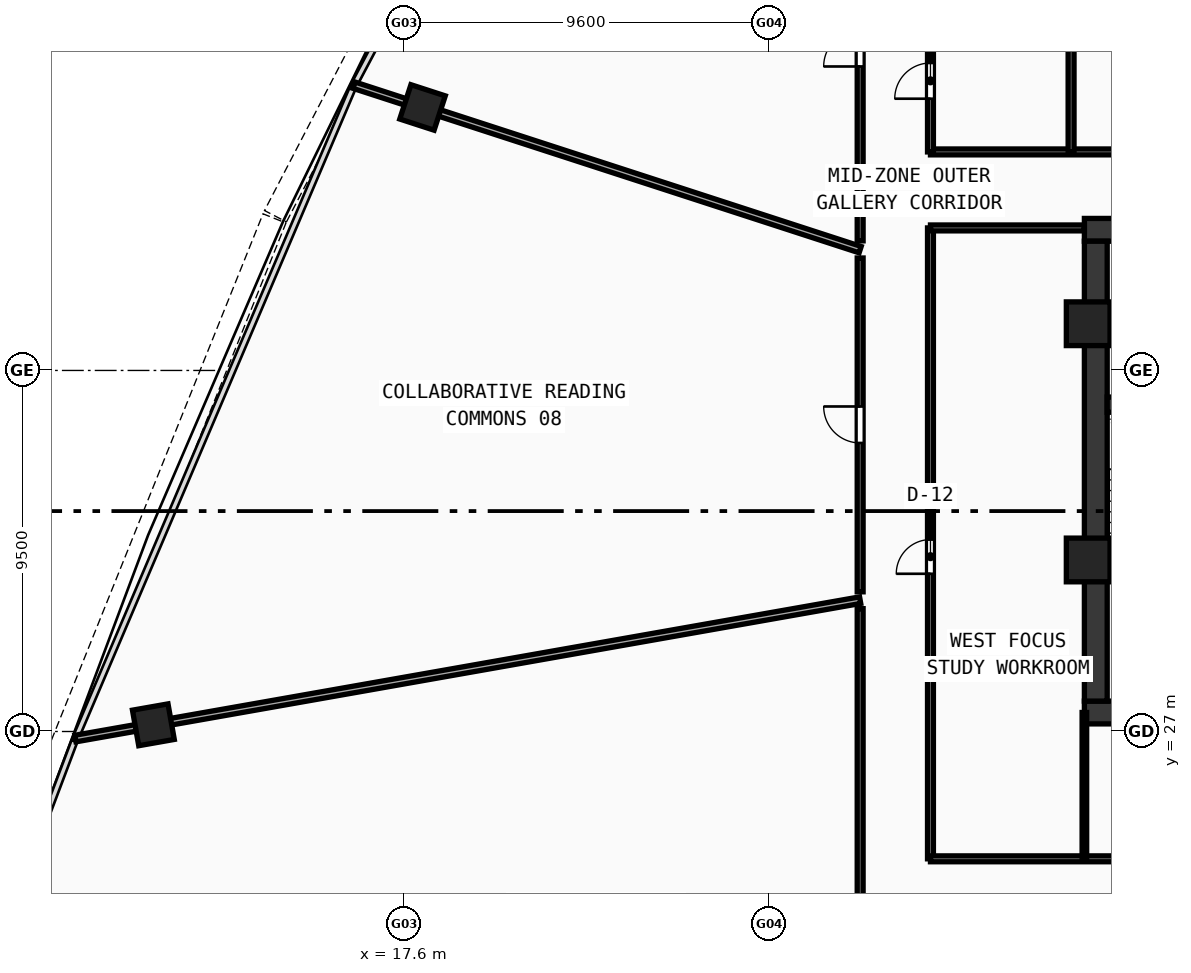
"""IFC4 building model, lengths in metres.
Left out: names, types, materials, properties, quantities, classifications, styles, units other than length and angle.
Written with IfcOpenShell. Run it as: python <this file> out.ifc"""

import sys

from ifc_helpers import new_model, si_unit, direction, frame, frame_2d, origin, origin_with_axes, origin_2d, place, context, subcontext, project, spatial, rectangle, hollow_rectangle, extrude, source, transform, mapped, element, fill, save


model = new_model("IFC4")
c1 = context("Model", 3, precision=1e-05, world=origin(), true_north=direction((0.0, 1.0)))
c2 = subcontext(c1, "Body", "Model", "MODEL_VIEW")
j1 = project(units=[si_unit("LENGTHUNIT", "METRE"), si_unit("PLANEANGLEUNIT", "RADIAN")], contexts=[c1])
p1 = place(None, origin())
s1 = spatial("IfcSite", under=j1, at=p1, CompositionType="ELEMENT")
p2 = place(p1, origin())
s2 = spatial("IfcBuilding", under=s1, at=p2, CompositionType="ELEMENT")
p3 = place(p2, frame((0.0, 0.0, 133.51)))
s3 = spatial("IfcBuildingStorey", under=s2, at=p3, CompositionType="ELEMENT", Elevation=133.51)
p4 = place(p3, frame((35.5, 27.5, 0.0), z_axis=(0.0, 0.0, 1.0), x_axis=(1.0, 0.0, 0.0)))
e1 = element("IfcWall", 1, at=p4, inside=s3, PredefinedType="SHEAR", context=c2, shape_type="SweptSolid", body=[
    extrude(rectangle(XDim=25.0, YDim=0.6, at=frame_2d((12.5, 0.0))), origin(), (0.0, 0.0, 1.0), 3.42),
])
p5 = place(p3, frame((35.5, 40.2, 0.0), z_axis=(0.0, 0.0, 1.0), x_axis=(1.0, 0.0, 0.0)))
e2 = element("IfcWall", 2, at=p5, inside=s3, PredefinedType="SHEAR", context=c2, shape_type="SweptSolid", body=[
    extrude(rectangle(XDim=11.3, YDim=0.6, at=frame_2d((5.65, 0.0))), origin(), (0.0, 0.0, 1.0), 3.42),
])
p6 = place(p5, frame((1.65, 0.0, 0.0)))
e3 = element("IfcOpeningElement", 3, at=p6, cuts=e2, PredefinedType="OPENING", context=c2, shape_type="SweptSolid", body=[
    extrude(rectangle(XDim=1.05, YDim=2.1, at=frame_2d((0.525, 1.05))), frame((0.0, 0.31, 0.0), z_axis=(0.0, -1.0, 0.0), x_axis=(1.0, 0.0, 0.0)), (0.0, 0.0, 1.0), 0.62),
])
p7 = place(p3, frame((35.8, 27.8, 0.0), z_axis=(0.0, 0.0, 1.0), x_axis=(0.0, 1.0, 0.0)))
e4 = element("IfcWall", 4, at=p7, inside=s3, PredefinedType="SHEAR", context=c2, shape_type="SweptSolid", body=[
    extrude(rectangle(XDim=12.1, YDim=0.6, at=frame_2d((6.05, 0.0))), origin(), (0.0, 0.0, 1.0), 3.42),
])
p8 = place(p3, frame((36.1, 35.6, 0.0), z_axis=(0.0, 0.0, 1.0), x_axis=(1.0, 0.0, 0.0)))
e5 = element("IfcWall", 5, at=p8, inside=s3, PredefinedType="SHEAR", context=c2, shape_type="SweptSolid", body=[
    extrude(rectangle(XDim=3.1, YDim=0.4, at=frame_2d((1.55, 0.0))), origin(), (0.0, 0.0, 1.0), 3.42),
])
p9 = place(p8, frame((1.02, 0.0, 0.0)))
e6 = element("IfcOpeningElement", 6, at=p9, cuts=e5, PredefinedType="OPENING", context=c2, shape_type="SweptSolid", body=[
    extrude(rectangle(XDim=1.05, YDim=2.1, at=frame_2d((0.525, 1.05))), frame((0.0, 0.21, 0.0), z_axis=(0.0, -1.0, 0.0), x_axis=(1.0, 0.0, 0.0)), (0.0, 0.0, 1.0), 0.42),
])
m1 = source(origin(), c2, "Body", "SweptSolid", [
    extrude(hollow_rectangle(XDim=1.15, YDim=1.15, WallThickness=0.048, at=origin_2d()), origin(), (0.0, 0.0, 1.0), 3.68),
])
for number, where, z_axis, x_axis in (
    (7, (35.6, 37.729, -0.26), (0.0, 0.0, 1.0), (1.0, 0.0, 0.0)),
    (8, (35.6, 31.513, -0.26), (0.0, 0.0, 1.0), (1.0, 0.0, 0.0)),
):
    element("IfcColumn", number, at=place(p3, frame(where, z_axis=z_axis, x_axis=x_axis)), inside=s3, PredefinedType="COLUMN", context=c2, shape_type="MappedRepresentation", body=[
        mapped(m1, transform((0.0, 0.0, 0.0), scale=1.0)),
    ])
m2 = source(origin(), c2, "Body", "SweptSolid", [
    extrude(hollow_rectangle(XDim=0.95, YDim=0.95, WallThickness=0.04, at=origin_2d()), origin(), (0.0, 0.0, 1.0), 3.68),
])
for number, where, z_axis, x_axis in (
    (9, (18.085, 43.42, -0.26), (0.0, 0.0, 1.0), (-0.309, -0.951, 0.0)),
    (10, (11.003, 27.177, -0.26), (0.0, 0.0, 1.0), (0.174, -0.985, 0.0)),
):
    element("IfcColumn", number, at=place(p3, frame(where, z_axis=z_axis, x_axis=x_axis)), inside=s3, PredefinedType="COLUMN", context=c2, shape_type="MappedRepresentation", body=[
        mapped(m2, transform((0.0, 0.0, 0.0), scale=1.0)),
    ])
p10 = place(p3, frame((31.45, 42.25, 0.0), z_axis=(0.0, 0.0, 1.0), x_axis=(1.0, 0.0, 0.0)))
e11 = element("IfcWall", 11, at=p10, inside=s3, PredefinedType="PARTITIONING", context=c2, shape_type="SweptSolid", body=[
    extrude(rectangle(XDim=33.1, YDim=0.155, at=frame_2d((16.55, 0.0))), origin(), (0.0, 0.0, 1.0), 2.77),
])
p11 = place(p3, frame((31.45, 42.25, 0.0), z_axis=(0.0, 0.0, 1.0), x_axis=(0.0, 1.0, 0.0)))
e12 = element("IfcWall", 12, at=p11, inside=s3, PredefinedType="PARTITIONING", context=c2, shape_type="SweptSolid", body=[
    extrude(rectangle(XDim=11.7, YDim=0.155, at=frame_2d((5.85, 0.0))), origin(), (0.0, 0.0, 1.0), 2.77),
])
p12 = place(p11, frame((1.4, 0.0, 0.0)))
e13 = element("IfcOpeningElement", 13, at=p12, cuts=e12, PredefinedType="OPENING", context=c2, shape_type="SweptSolid", body=[
    extrude(rectangle(XDim=0.94, YDim=2.1, at=frame_2d((0.47, 1.05))), frame((0.0, 0.087, 0.0), z_axis=(0.0, -1.0, 0.0), x_axis=(1.0, 0.0, 0.0)), (0.0, 0.0, 1.0), 0.175),
])
p13 = place(p11, frame((6.8, 0.0, 0.0)))
e14 = element("IfcOpeningElement", 14, at=p13, cuts=e12, PredefinedType="OPENING", context=c2, shape_type="SweptSolid", body=[
    extrude(rectangle(XDim=0.92, YDim=2.1, at=frame_2d((0.46, 1.05))), frame((0.0, 0.087, 0.0), z_axis=(0.0, -1.0, 0.0), x_axis=(1.0, 0.0, 0.0)), (0.0, 0.0, 1.0), 0.175),
])
p14 = place(p3, frame((35.15, 42.25, 0.0), z_axis=(0.0, 0.0, 1.0), x_axis=(0.0, 1.0, 0.0)))
e15 = element("IfcWall", 15, at=p14, inside=s3, PredefinedType="PARTITIONING", context=c2, shape_type="SweptSolid", body=[
    extrude(rectangle(XDim=11.7, YDim=0.155, at=frame_2d((5.85, 0.0))), origin(), (0.0, 0.0, 1.0), 2.77),
])
p15 = place(p3, frame((31.45, 23.65, 0.0), z_axis=(0.0, 0.0, 1.0), x_axis=(0.0, 1.0, 0.0)))
e16 = element("IfcWall", 16, at=p15, inside=s3, PredefinedType="PARTITIONING", context=c2, shape_type="SweptSolid", body=[
    extrude(rectangle(XDim=16.6, YDim=0.155, at=frame_2d((8.3, 0.0))), origin(), (0.0, 0.0, 1.0), 2.77),
])
p16 = place(p15, frame((7.5, 0.0, 0.0)))
e17 = element("IfcOpeningElement", 17, at=p16, cuts=e16, PredefinedType="OPENING", context=c2, shape_type="SweptSolid", body=[
    extrude(rectangle(XDim=0.9, YDim=2.08, at=frame_2d((0.45, 1.04))), frame((0.0, 0.087, 0.0), z_axis=(0.0, -1.0, 0.0), x_axis=(1.0, 0.0, 0.0)), (0.0, 0.0, 1.0), 0.175),
])
p17 = place(p3, frame((31.45, 23.65, 0.0), z_axis=(0.0, 0.0, 1.0), x_axis=(1.0, 0.0, 0.0)))
e18 = element("IfcWall", 18, at=p17, inside=s3, PredefinedType="PARTITIONING", context=c2, shape_type="SweptSolid", body=[
    extrude(rectangle(XDim=33.1, YDim=0.155, at=frame_2d((16.55, 0.0))), origin(), (0.0, 0.0, 1.0), 2.77),
])
p18 = place(p17, frame((16.0, 0.0, 0.0)))
e19 = element("IfcOpeningElement", 19, at=p18, cuts=e18, PredefinedType="OPENING", context=c2, shape_type="SweptSolid", body=[
    extrude(rectangle(XDim=0.92, YDim=2.1, at=frame_2d((0.46, 1.05))), frame((0.0, 0.087, 0.0), z_axis=(0.0, -1.0, 0.0), x_axis=(1.0, 0.0, 0.0)), (0.0, 0.0, 1.0), 0.175),
])
p19 = place(p3, frame((31.45, 40.25, 0.0), z_axis=(0.0, 0.0, 1.0), x_axis=(1.0, 0.0, 0.0)))
e20 = element("IfcWall", 20, at=p19, inside=s3, PredefinedType="PARTITIONING", context=c2, shape_type="SweptSolid", body=[
    extrude(rectangle(XDim=4.05, YDim=0.155, at=frame_2d((2.025, 0.0))), origin(), (0.0, 0.0, 1.0), 3.42),
])
p20 = place(p3, frame((35.5, 23.65, 0.0), z_axis=(0.0, 0.0, 1.0), x_axis=(0.0, 1.0, 0.0)))
e21 = element("IfcWall", 21, at=p20, inside=s3, PredefinedType="PARTITIONING", context=c2, shape_type="SweptSolid", body=[
    extrude(rectangle(XDim=3.85, YDim=0.12, at=frame_2d((1.925, 0.0))), origin(), (0.0, 0.0, 1.0), 3.02),
])
p21 = place(p3, frame((29.6, 39.678, 0.0), z_axis=(0.0, 0.0, 1.0), x_axis=(-0.95105622709, 0.309017884457, 0.0)))
e22 = element("IfcWall", 22, at=p21, inside=s3, PredefinedType="PARTITIONING", context=c2, shape_type="SweptSolid", body=[
    extrude(rectangle(XDim=14.006, YDim=0.175, at=frame_2d((7.003, 0.0))), origin(), (0.0, 0.0, 1.0), 2.77),
])
p22 = place(p3, frame((29.6, 30.456, 0.0), z_axis=(0.0, 0.0, 1.0), x_axis=(-0.98480711194, -0.173651813328, 0.0)))
e23 = element("IfcWall", 23, at=p22, inside=s3, PredefinedType="PARTITIONING", context=c2, shape_type="SweptSolid", body=[
    extrude(rectangle(XDim=20.967, YDim=0.175, at=frame_2d((10.483, 0.0))), origin(), (0.0, 0.0, 1.0), 2.77),
])
p23 = place(p3, frame((29.6, 21.8, 0.0), z_axis=(0.0, 0.0, 1.0), x_axis=(0.0, 1.0, 0.0)))
e24 = element("IfcWall", 24, at=p23, inside=s3, PredefinedType="PARTITIONING", context=c2, shape_type="SweptSolid", body=[
    extrude(rectangle(XDim=8.432, YDim=0.155, at=frame_2d((4.216, 0.0))), origin(), (0.0, 0.0, 1.0), 3.02),
])
p24 = place(p3, frame((29.6, 30.675, 0.0), z_axis=(0.0, 0.0, 1.0), x_axis=(0.0, 1.0, 0.0)))
e25 = element("IfcWall", 25, at=p24, inside=s3, PredefinedType="PARTITIONING", context=c2, shape_type="SweptSolid", body=[
    extrude(rectangle(XDim=8.783, YDim=0.155, at=frame_2d((4.392, 0.0))), origin(), (0.0, 0.0, 1.0), 3.42),
])
p25 = place(p24, frame((3.917, 0.0, 0.0)))
e26 = element("IfcOpeningElement", 26, at=p25, cuts=e25, PredefinedType="OPENING", context=c2, shape_type="SweptSolid", body=[
    extrude(rectangle(XDim=0.96, YDim=2.12, at=frame_2d((0.48, 1.06))), frame((0.0, 0.087, 0.0), z_axis=(0.0, -1.0, 0.0), x_axis=(1.0, 0.0, 0.0)), (0.0, 0.0, 1.0), 0.175),
])
p26 = place(p3, frame((29.6, 39.91, 0.0), z_axis=(0.0, 0.0, 1.0), x_axis=(0.0, 1.0, 0.0)))
e27 = element("IfcWall", 27, at=p26, inside=s3, PredefinedType="PARTITIONING", context=c2, shape_type="SweptSolid", body=[
    extrude(rectangle(XDim=10.138, YDim=0.155, at=frame_2d((5.069, 0.0))), origin(), (0.0, 0.0, 1.0), 2.77),
])
p27 = place(p26, frame((4.588, 0.0, 0.0)))
e28 = element("IfcOpeningElement", 28, at=p27, cuts=e27, PredefinedType="OPENING", context=c2, shape_type="SweptSolid", body=[
    extrude(rectangle(XDim=0.96, YDim=2.12, at=frame_2d((0.48, 1.06))), frame((0.0, 0.087, 0.0), z_axis=(0.0, -1.0, 0.0), x_axis=(1.0, 0.0, 0.0)), (0.0, 0.0, 1.0), 0.175),
])
m3 = source(origin(), c2, "Body", "SweptSolid", [
    extrude(rectangle(XDim=0.94, YDim=2.1, at=frame_2d((0.47, 1.05))), frame((0.0, 0.025, 0.0), z_axis=(0.0, -1.0, 0.0), x_axis=(1.0, 0.0, 0.0)), (0.0, 0.0, 1.0), 0.05),
])
p28 = place(p12, origin_with_axes())
e29 = element("IfcDoor", 29, at=p28, inside=s3, OperationType="SINGLE_SWING_LEFT", PredefinedType="DOOR", context=c2, shape_type="MappedRepresentation", body=[
    mapped(m3, transform((0.0, 0.0, 0.0), scale=1.0)),
])
fill(e13, e29)
m4 = source(origin(), c2, "Body", "SweptSolid", [
    extrude(rectangle(XDim=0.9, YDim=2.08, at=frame_2d((0.45, 1.04))), frame((0.0, 0.025, 0.0), z_axis=(0.0, -1.0, 0.0), x_axis=(1.0, 0.0, 0.0)), (0.0, 0.0, 1.0), 0.05),
])
p29 = place(p16, origin_with_axes())
e30 = element("IfcDoor", 30, at=p29, inside=s3, OperationType="SINGLE_SWING_LEFT", PredefinedType="DOOR", context=c2, shape_type="MappedRepresentation", body=[
    mapped(m4, transform((0.0, 0.0, 0.0), scale=1.0)),
])
fill(e17, e30)
m5 = source(origin(), c2, "Body", "SweptSolid", [
    extrude(rectangle(XDim=0.96, YDim=2.12, at=frame_2d((0.48, 1.06))), frame((0.0, 0.025, 0.0), z_axis=(0.0, -1.0, 0.0), x_axis=(1.0, 0.0, 0.0)), (0.0, 0.0, 1.0), 0.05),
])
p30 = place(p27, origin_with_axes())
e31 = element("IfcDoor", 31, at=p30, inside=s3, OperationType="SINGLE_SWING_LEFT", PredefinedType="DOOR", context=c2, shape_type="MappedRepresentation", body=[
    mapped(m5, transform((0.0, 0.0, 0.0), scale=1.0)),
])
fill(e28, e31)
p31 = place(p25, origin_with_axes())
e32 = element("IfcDoor", 32, at=p31, inside=s3, OperationType="SINGLE_SWING_RIGHT", PredefinedType="DOOR", context=c2, shape_type="MappedRepresentation", body=[
    mapped(m5, transform((0.0, 0.0, 0.0), scale=1.0)),
])
fill(e26, e32)
save(model, sys.argv[1])
